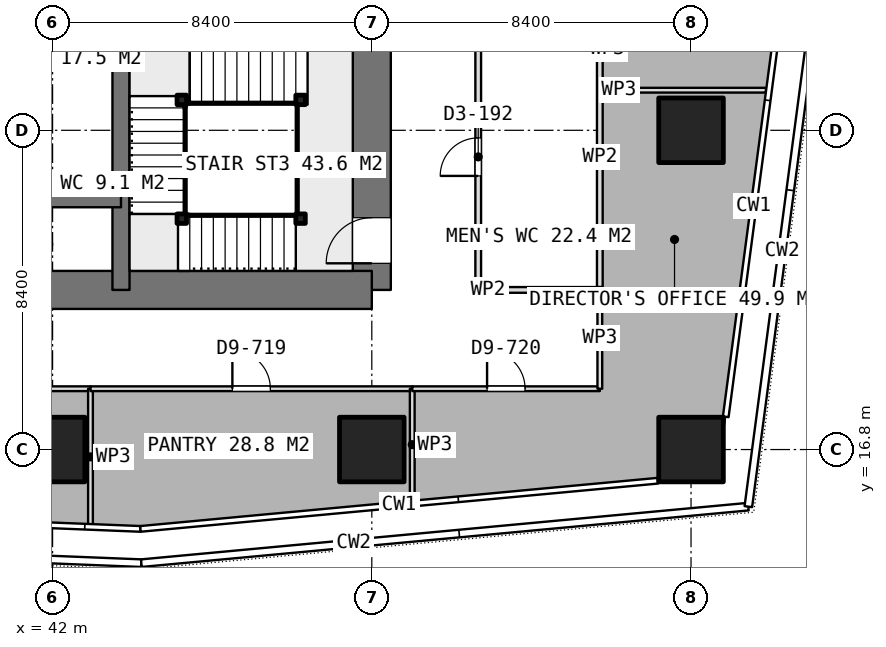
"""IFC4 building model, lengths in metres.
Left out: names, types, materials, properties, quantities, classifications, styles, units other than length and angle.
Written with IfcOpenShell. Run it as: python <this file> out.ifc"""

import sys

from ifc_helpers import new_model, si_unit, direction, frame, frame_2d, origin, origin_2d, place, context, subcontext, project, spatial, rectangle, extrude, element, fill, save


model = new_model("IFC4")
c1 = context("Model", 3, precision=1e-05, world=origin(), true_north=direction((0.0, 1.0)))
c2 = subcontext(c1, "Body", "Model", "MODEL_VIEW")
j1 = project(units=[si_unit("LENGTHUNIT", "METRE"), si_unit("PLANEANGLEUNIT", "RADIAN")], contexts=[c1])
p1 = place(None, origin())
s1 = spatial("IfcSite", under=j1, at=p1, CompositionType="ELEMENT")
p2 = place(p1, origin())
s2 = spatial("IfcBuilding", under=s1, at=p2, CompositionType="ELEMENT")
p3 = place(p2, frame((0.0, 0.0, 183.95)))
s3 = spatial("IfcBuildingStorey", under=s2, at=p3, CompositionType="ELEMENT", Elevation=183.95)
p4 = place(p3, frame((40.0, 21.0, 0.0), z_axis=(0.0, 0.0, 1.0), x_axis=(1.0, 0.0, 0.0)))
e1 = element("IfcWall", 1, at=p4, inside=s3, PredefinedType="SHEAR", context=c2, shape_type="SweptSolid", body=[
    extrude(rectangle(XDim=10.4, YDim=1.0, at=frame_2d((5.2, 0.0))), origin(), (0.0, 0.0, 1.0), 3.75),
])
p5 = place(p3, frame((50.4, 21.0, 0.0), z_axis=(0.0, 0.0, 1.0), x_axis=(0.0, 1.0, 0.0)))
e2 = element("IfcWall", 2, at=p5, inside=s3, PredefinedType="SHEAR", context=c2, shape_type="SweptSolid", body=[
    extrude(rectangle(XDim=25.2, YDim=1.0, at=frame_2d((12.6, 0.0))), origin(), (0.0, 0.0, 1.0), 3.75),
])
p6 = place(p5, frame((16.2, 0.0, 0.0)))
e3 = element("IfcOpeningElement", 3, at=p6, cuts=e2, PredefinedType="OPENING", context=c2, shape_type="SweptSolid", body=[
    extrude(rectangle(XDim=1.2, YDim=2.1, at=frame_2d((0.6, 1.05))), frame((0.0, 0.51, 0.0), z_axis=(0.0, -1.0, 0.0), x_axis=(1.0, 0.0, 0.0)), (0.0, 0.0, 1.0), 1.02),
])
p7 = place(p5, frame((10.05, 0.0, 0.0)))
e4 = element("IfcOpeningElement", 4, at=p7, cuts=e2, PredefinedType="OPENING", context=c2, shape_type="SweptSolid", body=[
    extrude(rectangle(XDim=0.9, YDim=2.1, at=frame_2d((0.45, 1.05))), frame((0.0, 0.51, 0.0), z_axis=(0.0, -1.0, 0.0), x_axis=(1.0, 0.0, 0.0)), (0.0, 0.0, 1.0), 1.02),
])
p8 = place(p5, frame((7.45, 0.0, 0.0)))
e5 = element("IfcOpeningElement", 5, at=p8, cuts=e2, PredefinedType="OPENING", context=c2, shape_type="SweptSolid", body=[
    extrude(rectangle(XDim=0.9, YDim=2.1, at=frame_2d((0.45, 1.05))), frame((0.0, 0.51, 0.0), z_axis=(0.0, -1.0, 0.0), x_axis=(1.0, 0.0, 0.0)), (0.0, 0.0, 1.0), 1.02),
])
p9 = place(p5, frame((0.7, 0.0, 0.0)))
e6 = element("IfcOpeningElement", 6, at=p9, cuts=e2, PredefinedType="OPENING", context=c2, shape_type="SweptSolid", body=[
    extrude(rectangle(XDim=1.2, YDim=2.1, at=frame_2d((0.6, 1.05))), frame((0.0, 0.51, 0.0), z_axis=(0.0, -1.0, 0.0), x_axis=(1.0, 0.0, 0.0)), (0.0, 0.0, 1.0), 1.02),
])
p10 = place(p3, frame((43.8, 21.0, 0.0), z_axis=(0.0, 0.0, 1.0), x_axis=(0.0, 1.0, 0.0)))
e7 = element("IfcWall", 7, at=p10, inside=s3, PredefinedType="SHEAR", context=c2, shape_type="SweptSolid", body=[
    extrude(rectangle(XDim=25.2, YDim=0.45, at=frame_2d((12.6, 0.0))), origin(), (0.0, 0.0, 1.0), 3.75),
])
p11 = place(p3, frame((40.0, 23.4, 0.0), z_axis=(0.0, 0.0, 1.0), x_axis=(1.0, 0.0, 0.0)))
e8 = element("IfcWall", 8, at=p11, inside=s3, PredefinedType="SHEAR", context=c2, shape_type="SweptSolid", body=[
    extrude(rectangle(XDim=3.8, YDim=0.45, at=frame_2d((1.9, 0.0))), origin(), (0.0, 0.0, 1.0), 3.75),
])
for number, where, z_axis, x_axis in (
    (9, (42.0, 16.8, 0.0), (0.0, 0.0, 1.0), (1.0, 0.0, 0.0)),
    (10, (50.4, 16.8, 0.0), (0.0, 0.0, 1.0), (1.0, 0.0, 0.0)),
    (11, (58.8, 16.8, 0.0), (0.0, 0.0, 1.0), (1.0, 0.0, 0.0)),
    (12, (58.8, 25.2, 0.0), (0.0, 0.0, 1.0), (1.0, 0.0, 0.0)),
):
    element("IfcColumn", number, at=place(p3, frame(where, z_axis=z_axis, x_axis=x_axis)), inside=s3, PredefinedType="COLUMN", context=c2, shape_type="SweptSolid", body=[
        extrude(rectangle(XDim=1.7, YDim=1.7, at=origin_2d()), origin(), (0.0, 0.0, 1.0), 3.75),
    ])
p12 = place(p3, frame((53.125, 21.0, 0.0), z_axis=(0.0, 0.0, 1.0), x_axis=(1.0, 0.0, 0.0)))
e13 = element("IfcWall", 13, at=p12, inside=s3, PredefinedType="PARTITIONING", context=c2, shape_type="SweptSolid", body=[
    extrude(rectangle(XDim=3.35, YDim=0.15, at=frame_2d((1.675, 0.0))), origin(), (0.0, 0.0, 1.0), 3.5),
])
p13 = place(p3, frame((53.2, 21.075, 0.0), z_axis=(0.0, 0.0, 1.0), x_axis=(0.0, 1.0, 0.0)))
e14 = element("IfcWall", 14, at=p13, inside=s3, PredefinedType="PARTITIONING", context=c2, shape_type="SweptSolid", body=[
    extrude(rectangle(XDim=6.85, YDim=0.15, at=frame_2d((3.425, 0.0))), origin(), (0.0, 0.0, 1.0), 3.5),
])
p14 = place(p13, frame((2.925, 0.0, 0.0)))
e15 = element("IfcOpeningElement", 15, at=p14, cuts=e14, PredefinedType="OPENING", context=c2, shape_type="SweptSolid", body=[
    extrude(rectangle(XDim=1.0, YDim=2.1, at=frame_2d((0.5, 1.05))), frame((0.0, 0.085, 0.0), z_axis=(0.0, -1.0, 0.0), x_axis=(1.0, 0.0, 0.0)), (0.0, 0.0, 1.0), 0.17),
])
p15 = place(p3, frame((56.4, 21.075, 0.0), z_axis=(0.0, 0.0, 1.0), x_axis=(0.0, 1.0, 0.0)))
e16 = element("IfcWall", 16, at=p15, inside=s3, PredefinedType="PARTITIONING", context=c2, shape_type="SweptSolid", body=[
    extrude(rectangle(XDim=6.85, YDim=0.15, at=frame_2d((3.425, 0.0))), origin(), (0.0, 0.0, 1.0), 3.5),
])
p16 = place(p3, frame((34.706, 18.4, 0.0), z_axis=(0.0, 0.0, 1.0), x_axis=(1.0, 0.0, 0.0)))
e17 = element("IfcWall", 17, at=p16, inside=s3, PredefinedType="PARTITIONING", context=c2, shape_type="SweptSolid", body=[
    extrude(rectangle(XDim=8.291, YDim=0.125, at=frame_2d((4.146, 0.0))), origin(), (0.0, 0.0, 1.0), 3.5),
])
p17 = place(p16, frame((3.645, 0.0, 0.0)))
e18 = element("IfcOpeningElement", 18, at=p17, cuts=e17, PredefinedType="OPENING", context=c2, shape_type="SweptSolid", body=[
    extrude(rectangle(XDim=1.0, YDim=2.1, at=frame_2d((0.5, 1.05))), frame((0.0, 0.073, 0.0), z_axis=(0.0, -1.0, 0.0), x_axis=(1.0, 0.0, 0.0)), (0.0, 0.0, 1.0), 0.145),
])
p18 = place(p3, frame((42.997, 18.4, 0.0), z_axis=(0.0, 0.0, 1.0), x_axis=(0.0, -1.0, 0.0)))
e19 = element("IfcWall", 19, at=p18, inside=s3, PredefinedType="PARTITIONING", context=c2, shape_type="SweptSolid", body=[
    extrude(rectangle(XDim=3.586, YDim=0.125, at=frame_2d((1.793, 0.0))), origin(), (0.0, 0.0, 1.0), 3.5),
])
p19 = place(p3, frame((42.998, 18.4, 0.0), z_axis=(0.0, 0.0, 1.0), x_axis=(1.0, 0.0, 0.0)))
e20 = element("IfcWall", 20, at=p19, inside=s3, PredefinedType="PARTITIONING", context=c2, shape_type="SweptSolid", body=[
    extrude(rectangle(XDim=8.466, YDim=0.125, at=frame_2d((4.233, 0.0))), origin(), (0.0, 0.0, 1.0), 3.5),
])
p20 = place(p19, frame((3.733, 0.0, 0.0)))
e21 = element("IfcOpeningElement", 21, at=p20, cuts=e20, PredefinedType="OPENING", context=c2, shape_type="SweptSolid", body=[
    extrude(rectangle(XDim=1.0, YDim=2.1, at=frame_2d((0.5, 1.05))), frame((0.0, 0.073, 0.0), z_axis=(0.0, -1.0, 0.0), x_axis=(1.0, 0.0, 0.0)), (0.0, 0.0, 1.0), 0.145),
])
p21 = place(p3, frame((51.464, 18.4, 0.0), z_axis=(0.0, 0.0, 1.0), x_axis=(0.0, -1.0, 0.0)))
e22 = element("IfcWall", 22, at=p21, inside=s3, PredefinedType="PARTITIONING", context=c2, shape_type="SweptSolid", body=[
    extrude(rectangle(XDim=2.942, YDim=0.125, at=frame_2d((1.471, 0.0))), origin(), (0.0, 0.0, 1.0), 3.5),
])
p22 = place(p3, frame((51.465, 18.4, 0.0), z_axis=(0.0, 0.0, 1.0), x_axis=(1.0, 0.0, 0.0)))
e23 = element("IfcWall", 23, at=p22, inside=s3, PredefinedType="PARTITIONING", context=c2, shape_type="SweptSolid", body=[
    extrude(rectangle(XDim=4.935, YDim=0.125, at=frame_2d((2.467, 0.0))), origin(), (0.0, 0.0, 1.0), 3.5),
])
p23 = place(p22, frame((1.968, 0.0, 0.0)))
e24 = element("IfcOpeningElement", 24, at=p23, cuts=e23, PredefinedType="OPENING", context=c2, shape_type="SweptSolid", body=[
    extrude(rectangle(XDim=1.0, YDim=2.1, at=frame_2d((0.5, 1.05))), frame((0.0, 0.073, 0.0), z_axis=(0.0, -1.0, 0.0), x_axis=(1.0, 0.0, 0.0)), (0.0, 0.0, 1.0), 0.145),
])
p24 = place(p3, frame((56.4, 18.4, 0.0), z_axis=(0.0, 0.0, 1.0), x_axis=(0.0, 1.0, 0.0)))
e25 = element("IfcWall", 25, at=p24, inside=s3, PredefinedType="PARTITIONING", context=c2, shape_type="SweptSolid", body=[
    extrude(rectangle(XDim=2.675, YDim=0.125, at=frame_2d((1.337, 0.0))), origin(), (0.0, 0.0, 1.0), 3.5),
])
p25 = place(p3, frame((56.475, 26.255, 0.0), z_axis=(0.0, 0.0, 1.0), x_axis=(1.0, 0.0, 0.0)))
e26 = element("IfcWall", 26, at=p25, inside=s3, PredefinedType="PARTITIONING", context=c2, shape_type="SweptSolid", body=[
    extrude(rectangle(XDim=4.296, YDim=0.125, at=frame_2d((2.148, 0.0))), origin(), (0.0, 0.0, 1.0), 3.5),
])
for number, where, z_axis, x_axis in (
    (27, (48.525, 22.875, 0.0), (0.0, 0.0, 1.0), (1.0, 0.0, 0.0)),
    (28, (45.4, 22.875, 0.0), (0.0, 0.0, 1.0), (1.0, 0.0, 0.0)),
    (29, (45.4, 26.0, 0.0), (0.0, 0.0, 1.0), (1.0, 0.0, 0.0)),
    (30, (48.525, 26.0, 0.0), (0.0, 0.0, 1.0), (1.0, 0.0, 0.0)),
):
    element("IfcColumn", number, at=place(p3, frame(where, z_axis=z_axis, x_axis=x_axis)), inside=s3, PredefinedType="COLUMN", context=c2, shape_type="SweptSolid", body=[
        extrude(rectangle(XDim=0.25, YDim=0.25, at=origin_2d()), origin(), (0.0, 0.0, 1.0), 3.75),
    ])
p26 = place(p14, origin())
e31 = element("IfcDoor", 31, at=p26, inside=s3, OperationType="SINGLE_SWING_LEFT", PredefinedType="DOOR", context=c2, shape_type="SweptSolid", body=[
    extrude(rectangle(XDim=1.0, YDim=2.1, at=frame_2d((0.5, 1.05))), frame((0.0, 0.025, 0.0), z_axis=(0.0, -1.0, 0.0), x_axis=(1.0, 0.0, 0.0)), (0.0, 0.0, 1.0), 0.05),
])
fill(e15, e31)
p27 = place(p20, origin())
e32 = element("IfcDoor", 32, at=p27, inside=s3, OperationType="SINGLE_SWING_LEFT", PredefinedType="DOOR", context=c2, shape_type="SweptSolid", body=[
    extrude(rectangle(XDim=1.0, YDim=2.1, at=frame_2d((0.5, 1.05))), frame((0.0, 0.025, 0.0), z_axis=(0.0, -1.0, 0.0), x_axis=(1.0, 0.0, 0.0)), (0.0, 0.0, 1.0), 0.05),
])
fill(e21, e32)
p28 = place(p23, origin())
e33 = element("IfcDoor", 33, at=p28, inside=s3, OperationType="SINGLE_SWING_LEFT", PredefinedType="DOOR", context=c2, shape_type="SweptSolid", body=[
    extrude(rectangle(XDim=1.0, YDim=2.1, at=frame_2d((0.5, 1.05))), frame((0.0, 0.025, 0.0), z_axis=(0.0, -1.0, 0.0), x_axis=(1.0, 0.0, 0.0)), (0.0, 0.0, 1.0), 0.05),
])
fill(e24, e33)
p29 = place(p9, origin())
e34 = element("IfcDoor", 34, at=p29, inside=s3, OperationType="SINGLE_SWING_RIGHT", PredefinedType="DOOR", context=c2, shape_type="SweptSolid", body=[
    extrude(rectangle(XDim=1.2, YDim=2.1, at=frame_2d((0.6, 1.05))), frame((0.0, 0.025, 0.0), z_axis=(0.0, -1.0, 0.0), x_axis=(1.0, 0.0, 0.0)), (0.0, 0.0, 1.0), 0.05),
])
fill(e6, e34)
save(model, sys.argv[1])
